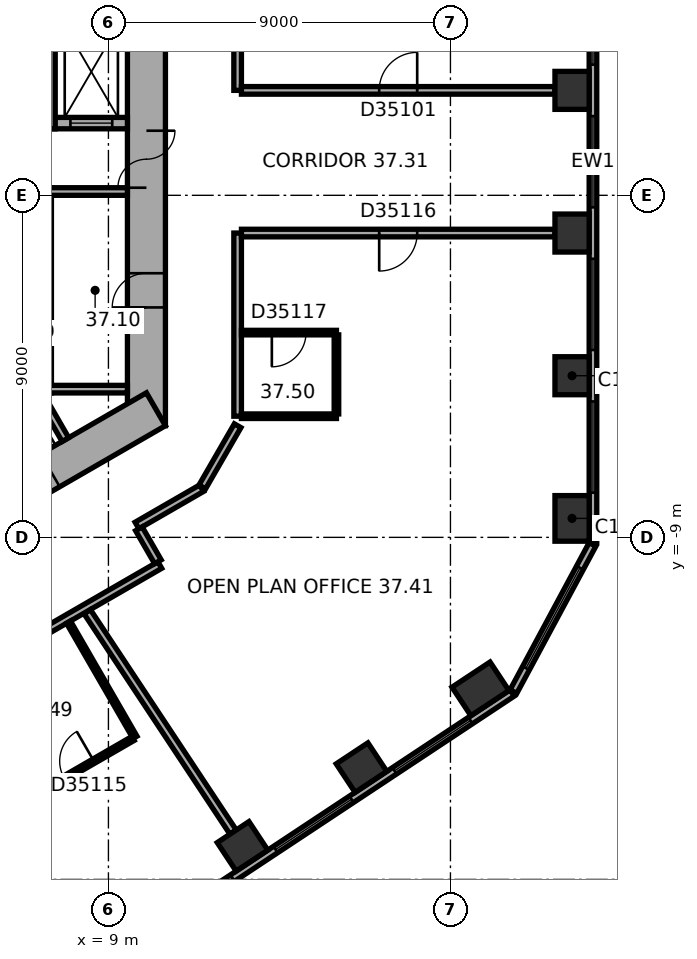
"""IFC4 building model, lengths in metres.
Left out: names, types, materials, properties, quantities, classifications, styles, units other than length and angle.
Written with IfcOpenShell. Run it as: python <this file> out.ifc"""

import sys

from ifc_helpers import new_model, si_unit, direction, frame, frame_2d, origin, origin_2d, place, context, subcontext, project, spatial, rectangle, extrude, element, fill, save


model = new_model("IFC4")
c1 = context("Model", 3, precision=1e-05, world=origin(), true_north=direction((0.0, 1.0)))
c2 = subcontext(c1, "Body", "Model", "MODEL_VIEW")
j1 = project(units=[si_unit("LENGTHUNIT", "METRE"), si_unit("PLANEANGLEUNIT", "RADIAN")], contexts=[c1])
p1 = place(None, origin())
s1 = spatial("IfcSite", under=j1, at=p1, CompositionType="ELEMENT")
p2 = place(p1, origin())
s2 = spatial("IfcBuilding", under=s1, at=p2, CompositionType="ELEMENT")
p3 = place(p2, frame((0.0, 0.0, 154.0)))
s3 = spatial("IfcBuildingStorey", under=s2, at=p3, CompositionType="ELEMENT", Elevation=154.0)
p4 = place(p3, frame((21.2, -8.501, 0.0), z_axis=(0.0, 0.0, 1.0), x_axis=(0.0, 1.0, 0.0)))
e1 = element("IfcColumn", 1, at=p4, inside=s3, PredefinedType="COLUMN", context=c2, shape_type="SweptSolid", body=[
    extrude(rectangle(XDim=1.2, YDim=0.9, at=origin_2d()), origin(), (0.0, 0.0, 1.0), 3.7),
])
for number, where, z_axis, x_axis in (
    (2, (21.2, -4.747, 0.0), (0.0, 0.0, 1.0), (0.0, 1.0, 0.0)),
    (3, (21.2, -0.993, 0.0), (0.0, 0.0, 1.0), (0.0, 1.0, 0.0)),
    (4, (21.2, 2.761, 0.0), (0.0, 0.0, 1.0), (0.0, 1.0, 0.0)),
    (5, (12.529, -17.13, 0.0), (0.0, 0.0, 1.0), (0.834, 0.552, 0.0)),
    (6, (15.659, -15.058, 0.0), (0.0, 0.0, 1.0), (0.834, 0.552, 0.0)),
):
    element("IfcColumn", number, at=place(p3, frame(where, z_axis=z_axis, x_axis=x_axis)), inside=s3, PredefinedType="COLUMN", context=c2, shape_type="SweptSolid", body=[
        extrude(rectangle(XDim=1.0, YDim=0.9, at=origin_2d()), origin(), (0.0, 0.0, 1.0), 3.7),
    ])
p5 = place(p3, frame((18.79, -12.986, 0.0), z_axis=(0.0, 0.0, 1.0), x_axis=(0.833885822067, 0.551936985312, 0.0)))
e7 = element("IfcColumn", 7, at=p5, inside=s3, PredefinedType="COLUMN", context=c2, shape_type="SweptSolid", body=[
    extrude(rectangle(XDim=1.2, YDim=0.9, at=origin_2d()), origin(), (0.0, 0.0, 1.0), 3.7),
])
p6 = place(p3, frame((10.0, -6.062, 0.0), z_axis=(0.0, 0.0, 1.0), x_axis=(0.0, 1.0, 0.0)))
e8 = element("IfcWall", 8, at=p6, inside=s3, PredefinedType="SHEAR", context=c2, shape_type="SweptSolid", body=[
    extrude(rectangle(XDim=12.125, YDim=1.0, at=frame_2d((6.062, 0.0))), origin(), (0.0, 0.0, 1.0), 3.7),
])
p7 = place(p6, frame((6.262, 0.0, 0.0)))
e9 = element("IfcOpeningElement", 9, at=p7, cuts=e8, PredefinedType="OPENING", context=c2, shape_type="SweptSolid", body=[
    extrude(rectangle(XDim=1.5, YDim=2.1, at=frame_2d((0.75, 1.05))), frame((0.0, 0.51, 0.0), z_axis=(0.0, -1.0, 0.0), x_axis=(1.0, 0.0, 0.0)), (0.0, 0.0, 1.0), 1.02),
])
p8 = place(p6, frame((3.112, 0.0, 0.0)))
e10 = element("IfcOpeningElement", 10, at=p8, cuts=e8, PredefinedType="OPENING", context=c2, shape_type="SweptSolid", body=[
    extrude(rectangle(XDim=0.9, YDim=2.1, at=frame_2d((0.45, 1.05))), frame((0.0, 0.51, 0.0), z_axis=(0.0, -1.0, 0.0), x_axis=(1.0, 0.0, 0.0)), (0.0, 0.0, 1.0), 1.02),
])
p9 = place(p3, frame((-0.25, -11.691, 0.0), z_axis=(0.0, 0.0, 1.0), x_axis=(0.866022616891, 0.50000482701, 0.0)))
e11 = element("IfcWall", 11, at=p9, inside=s3, PredefinedType="SHEAR", context=c2, shape_type="SweptSolid", body=[
    extrude(rectangle(XDim=12.125, YDim=1.0, at=frame_2d((6.062, 0.0))), origin(), (0.0, 0.0, 1.0), 3.7),
])
p10 = place(p9, frame((2.612, 0.0, 0.0)))
e12 = element("IfcOpeningElement", 12, at=p10, cuts=e11, PredefinedType="OPENING", context=c2, shape_type="SweptSolid", body=[
    extrude(rectangle(XDim=1.1, YDim=2.1, at=frame_2d((0.55, 1.05))), frame((0.0, 0.51, 0.0), z_axis=(0.0, -1.0, 0.0), x_axis=(1.0, 0.0, 0.0)), (0.0, 0.0, 1.0), 1.02),
])
p11 = place(p9, frame((5.212, 0.0, 0.0)))
e13 = element("IfcOpeningElement", 13, at=p11, cuts=e11, PredefinedType="OPENING", context=c2, shape_type="SweptSolid", body=[
    extrude(rectangle(XDim=1.1, YDim=2.1, at=frame_2d((0.55, 1.05))), frame((0.0, 0.51, 0.0), z_axis=(0.0, -1.0, 0.0), x_axis=(1.0, 0.0, 0.0)), (0.0, 0.0, 1.0), 1.02),
])
p12 = place(p9, frame((7.812, 0.0, 0.0)))
e14 = element("IfcOpeningElement", 14, at=p12, cuts=e11, PredefinedType="OPENING", context=c2, shape_type="SweptSolid", body=[
    extrude(rectangle(XDim=1.1, YDim=2.1, at=frame_2d((0.55, 1.05))), frame((0.0, 0.51, 0.0), z_axis=(0.0, -1.0, 0.0), x_axis=(1.0, 0.0, 0.0)), (0.0, 0.0, 1.0), 1.02),
])
p13 = place(p3, frame((21.75, -9.138, 0.0), z_axis=(0.0, 0.0, 1.0), x_axis=(0.0, 1.0, 0.0)))
e15 = element("IfcWall", 15, at=p13, inside=s3, PredefinedType="STANDARD", context=c2, shape_type="SweptSolid", body=[
    extrude(rectangle(XDim=20.044, YDim=0.2, at=frame_2d((10.022, 0.0))), origin(), (0.0, 0.0, 1.0), 3.7),
])
p14 = place(p13, frame((1.314, 0.0, 0.9)))
e16 = element("IfcOpeningElement", 16, at=p14, cuts=e15, PredefinedType="OPENING", context=c2, shape_type="SweptSolid", body=[
    extrude(rectangle(XDim=2.4, YDim=2.0, at=frame_2d((1.2, 1.0))), frame((0.0, 0.11, 0.0), z_axis=(0.0, -1.0, 0.0), x_axis=(1.0, 0.0, 0.0)), (0.0, 0.0, 1.0), 0.22),
])
p15 = place(p13, frame((5.069, 0.0, 0.9)))
e17 = element("IfcOpeningElement", 17, at=p15, cuts=e15, PredefinedType="OPENING", context=c2, shape_type="SweptSolid", body=[
    extrude(rectangle(XDim=2.4, YDim=2.0, at=frame_2d((1.2, 1.0))), frame((0.0, 0.11, 0.0), z_axis=(0.0, -1.0, 0.0), x_axis=(1.0, 0.0, 0.0)), (0.0, 0.0, 1.0), 0.22),
])
p16 = place(p13, frame((8.823, 0.0, 0.9)))
e18 = element("IfcOpeningElement", 18, at=p16, cuts=e15, PredefinedType="OPENING", context=c2, shape_type="SweptSolid", body=[
    extrude(rectangle(XDim=2.4, YDim=2.0, at=frame_2d((1.2, 1.0))), frame((0.0, 0.11, 0.0), z_axis=(0.0, -1.0, 0.0), x_axis=(1.0, 0.0, 0.0)), (0.0, 0.0, 1.0), 0.22),
])
p17 = place(p13, frame((12.577, 0.0, 0.9)))
e19 = element("IfcOpeningElement", 19, at=p17, cuts=e15, PredefinedType="OPENING", context=c2, shape_type="SweptSolid", body=[
    extrude(rectangle(XDim=2.4, YDim=2.0, at=frame_2d((1.2, 1.0))), frame((0.0, 0.11, 0.0), z_axis=(0.0, -1.0, 0.0), x_axis=(1.0, 0.0, 0.0)), (0.0, 0.0, 1.0), 0.22),
])
p18 = place(p13, frame((16.331, 0.0, 0.9)))
e20 = element("IfcOpeningElement", 20, at=p18, cuts=e15, PredefinedType="OPENING", context=c2, shape_type="SweptSolid", body=[
    extrude(rectangle(XDim=2.4, YDim=2.0, at=frame_2d((1.2, 1.0))), frame((0.0, 0.11, 0.0), z_axis=(0.0, -1.0, 0.0), x_axis=(1.0, 0.0, 0.0)), (0.0, 0.0, 1.0), 0.22),
])
p19 = place(p3, frame((2.911, -24.156, 0.0), z_axis=(0.0, 0.0, 1.0), x_axis=(0.833882163564, 0.551942512668, 0.0)))
e21 = element("IfcWall", 21, at=p19, inside=s3, PredefinedType="STANDARD", context=c2, shape_type="SweptSolid", body=[
    extrude(rectangle(XDim=20.044, YDim=0.2, at=frame_2d((10.022, 0.0))), origin(), (0.0, 0.0, 1.0), 3.7),
])
p20 = place(p19, frame((1.313, 0.0, 0.9)))
e22 = element("IfcOpeningElement", 22, at=p20, cuts=e21, PredefinedType="OPENING", context=c2, shape_type="SweptSolid", body=[
    extrude(rectangle(XDim=2.4, YDim=2.0, at=frame_2d((1.2, 1.0))), frame((0.0, 0.11, 0.0), z_axis=(0.0, -1.0, 0.0), x_axis=(1.0, 0.0, 0.0)), (0.0, 0.0, 1.0), 0.22),
])
p21 = place(p19, frame((5.067, 0.0, 0.9)))
e23 = element("IfcOpeningElement", 23, at=p21, cuts=e21, PredefinedType="OPENING", context=c2, shape_type="SweptSolid", body=[
    extrude(rectangle(XDim=2.4, YDim=2.0, at=frame_2d((1.2, 1.0))), frame((0.0, 0.11, 0.0), z_axis=(0.0, -1.0, 0.0), x_axis=(1.0, 0.0, 0.0)), (0.0, 0.0, 1.0), 0.22),
])
p22 = place(p19, frame((8.821, 0.0, 0.9)))
e24 = element("IfcOpeningElement", 24, at=p22, cuts=e21, PredefinedType="OPENING", context=c2, shape_type="SweptSolid", body=[
    extrude(rectangle(XDim=2.4, YDim=2.0, at=frame_2d((1.2, 1.0))), frame((0.0, 0.11, 0.0), z_axis=(0.0, -1.0, 0.0), x_axis=(1.0, 0.0, 0.0)), (0.0, 0.0, 1.0), 0.22),
])
p23 = place(p19, frame((12.575, 0.0, 0.9)))
e25 = element("IfcOpeningElement", 25, at=p23, cuts=e21, PredefinedType="OPENING", context=c2, shape_type="SweptSolid", body=[
    extrude(rectangle(XDim=2.4, YDim=2.0, at=frame_2d((1.2, 1.0))), frame((0.0, 0.11, 0.0), z_axis=(0.0, -1.0, 0.0), x_axis=(1.0, 0.0, 0.0)), (0.0, 0.0, 1.0), 0.22),
])
p24 = place(p19, frame((16.329, 0.0, 0.9)))
e26 = element("IfcOpeningElement", 26, at=p24, cuts=e21, PredefinedType="OPENING", context=c2, shape_type="SweptSolid", body=[
    extrude(rectangle(XDim=2.4, YDim=2.0, at=frame_2d((1.2, 1.0))), frame((0.0, 0.11, 0.0), z_axis=(0.0, -1.0, 0.0), x_axis=(1.0, 0.0, 0.0)), (0.0, 0.0, 1.0), 0.22),
])
p25 = place(p3, frame((19.658, -13.057, 0.0), z_axis=(0.0, 0.0, 1.0), x_axis=(0.473307879841, 0.880897071672, 0.0)))
e27 = element("IfcWall", 27, at=p25, inside=s3, PredefinedType="STANDARD", context=c2, shape_type="SweptSolid", body=[
    extrude(rectangle(XDim=4.395, YDim=0.2, at=frame_2d((2.197, 0.0))), origin(), (0.0, 0.0, 1.0), 3.7),
])
p26 = place(p25, frame((0.698, 0.0, 0.9)))
e28 = element("IfcOpeningElement", 28, at=p26, cuts=e27, PredefinedType="OPENING", context=c2, shape_type="SweptSolid", body=[
    extrude(rectangle(XDim=3.0, YDim=2.0, at=frame_2d((1.5, 1.0))), frame((0.0, 0.11, 0.0), z_axis=(0.0, -1.0, 0.0), x_axis=(1.0, 0.0, 0.0)), (0.0, 0.0, 1.0), 0.22),
])
for number, where, z_axis, x_axis in (
    (29, (7.3, -5.1, 0.0), (0.0, 0.0, 1.0), (1.0, 0.0, 0.0)),
    (30, (7.3, 0.1, 0.0), (0.0, 0.0, 1.0), (1.0, 0.0, 0.0)),
    (31, (6.768, -4.522, 0.0), (0.0, 0.0, 1.0), (0.5, -0.866, 0.0)),
):
    element("IfcWall", number, at=place(p3, frame(where, z_axis=z_axis, x_axis=x_axis)), inside=s3, PredefinedType="PARTITIONING", context=c2, shape_type="SweptSolid", body=[
        extrude(rectangle(XDim=2.2, YDim=0.2, at=frame_2d((1.1, 0.0))), origin(), (0.0, 0.0, 1.0), 3.42),
    ])
p27 = place(p3, frame((7.3, 1.9, 0.0), z_axis=(0.0, 0.0, 1.0), x_axis=(1.0, 0.0, 0.0)))
e32 = element("IfcWall", 32, at=p27, inside=s3, PredefinedType="SHEAR", context=c2, shape_type="SweptSolid", body=[
    extrude(rectangle(XDim=2.2, YDim=0.3, at=frame_2d((1.1, 0.0))), origin(), (0.0, 0.0, 1.0), 3.42),
])
p28 = place(p27, frame((0.7, 0.0, 0.0)))
e33 = element("IfcOpeningElement", 33, at=p28, cuts=e32, PredefinedType="OPENING", context=c2, shape_type="SweptSolid", body=[
    extrude(rectangle(XDim=1.1, YDim=2.1, at=frame_2d((0.55, 1.05))), frame((0.0, 0.16, 0.0), z_axis=(0.0, -1.0, 0.0), x_axis=(1.0, 0.0, 0.0)), (0.0, 0.0, 1.0), 0.32),
])
p29 = place(p3, frame((7.45, 1.75, 0.0), z_axis=(0.0, 0.0, 1.0), x_axis=(0.0, 1.0, 0.0)))
e34 = element("IfcWall", 34, at=p29, inside=s3, PredefinedType="SHEAR", context=c2, shape_type="SweptSolid", body=[
    extrude(rectangle(XDim=3.35, YDim=0.3, at=frame_2d((1.675, 0.0))), origin(), (0.0, 0.0, 1.0), 3.42),
])
p30 = place(p3, frame((4.955, -12.844, 0.0), z_axis=(0.0, 0.0, 1.0), x_axis=(0.86602379309, 0.500002789795, 0.0)))
e35 = element("IfcWall", 35, at=p30, inside=s3, PredefinedType="PARTITIONING", context=c2, shape_type="SweptSolid", body=[
    extrude(rectangle(XDim=6.232, YDim=0.2, at=frame_2d((3.116, 0.0))), origin(), (0.0, 0.0, 1.0), 3.42),
])
p31 = place(p3, frame((7.949, -11.231, 0.0), z_axis=(0.0, 0.0, 1.0), x_axis=(0.500010275428, -0.866019471182, 0.0)))
e36 = element("IfcWall", 36, at=p31, inside=s3, PredefinedType="PARTITIONING", context=c2, shape_type="SweptSolid", body=[
    extrude(rectangle(XDim=3.5, YDim=0.12, at=frame_2d((1.75, 0.0))), origin(), (0.0, 0.0, 1.0), 3.42),
])
p32 = place(p3, frame((9.647, -14.292, 0.0), z_axis=(0.0, 0.0, 1.0), x_axis=(-0.866040564224, -0.499973740429, 0.0)))
e37 = element("IfcWall", 37, at=p32, inside=s3, PredefinedType="PARTITIONING", context=c2, shape_type="SweptSolid", body=[
    extrude(rectangle(XDim=3.28, YDim=0.12, at=frame_2d((1.64, 0.0))), origin(), (0.0, 0.0, 1.0), 3.42),
])
p33 = place(p32, frame((1.19, 0.0, 0.0)))
e38 = element("IfcOpeningElement", 38, at=p33, cuts=e37, PredefinedType="OPENING", context=c2, shape_type="SweptSolid", body=[
    extrude(rectangle(XDim=0.9, YDim=2.1, at=frame_2d((0.45, 1.05))), frame((0.0, 0.07, 0.0), z_axis=(0.0, -1.0, 0.0), x_axis=(1.0, 0.0, 0.0)), (0.0, 0.0, 1.0), 0.14),
])
p34 = place(p3, frame((9.752, -8.688, 0.0), z_axis=(0.0, 0.0, 1.0), x_axis=(0.865974105138, 0.500088841337, 0.0)))
e39 = element("IfcWall", 39, at=p34, inside=s3, PredefinedType="PARTITIONING", context=c2, shape_type="SweptSolid", body=[
    extrude(rectangle(XDim=1.961, YDim=0.2, at=frame_2d((0.98, 0.0))), origin(), (0.0, 0.0, 1.0), 3.42),
])
p35 = place(p3, frame((10.302, -9.642, 0.0), z_axis=(0.0, 0.0, 1.0), x_axis=(-0.500074377092, 0.865982457891, 0.0)))
e40 = element("IfcWall", 40, at=p35, inside=s3, PredefinedType="PARTITIONING", context=c2, shape_type="SweptSolid", body=[
    extrude(rectangle(XDim=1.001, YDim=0.2, at=frame_2d((0.5, 0.0))), origin(), (0.0, 0.0, 1.0), 3.42),
])
p36 = place(p3, frame((11.47, -7.673, 0.0), z_axis=(0.0, 0.0, 1.0), x_axis=(0.499964847546, 0.866045698112, 0.0)))
e41 = element("IfcWall", 41, at=p36, inside=s3, PredefinedType="PARTITIONING", context=c2, shape_type="SweptSolid", body=[
    extrude(rectangle(XDim=1.86, YDim=0.2, at=frame_2d((0.93, 0.0))), origin(), (0.0, 0.0, 1.0), 3.42),
])
p37 = place(p3, frame((12.281, -16.755, 0.0), z_axis=(0.0, 0.0, 1.0), x_axis=(-0.551925794663, 0.833893228888, 0.0)))
e42 = element("IfcWall", 42, at=p37, inside=s3, PredefinedType="PARTITIONING", context=c2, shape_type="SweptSolid", body=[
    extrude(rectangle(XDim=6.953, YDim=0.2, at=frame_2d((3.476, 0.0))), origin(), (0.0, 0.0, 1.0), 3.42),
])
p38 = place(p3, frame((12.4, -5.812, 0.0), z_axis=(0.0, 0.0, 1.0), x_axis=(0.0, 1.0, 0.0)))
e43 = element("IfcWall", 43, at=p38, inside=s3, PredefinedType="PARTITIONING", context=c2, shape_type="SweptSolid", body=[
    extrude(rectangle(XDim=4.819, YDim=0.2, at=frame_2d((2.41, 0.0))), origin(), (0.0, 0.0, 1.0), 3.42),
])
p39 = place(p3, frame((12.4, 2.761, 0.0), z_axis=(0.0, 0.0, 1.0), x_axis=(0.0, 1.0, 0.0)))
e44 = element("IfcWall", 44, at=p39, inside=s3, PredefinedType="PARTITIONING", context=c2, shape_type="SweptSolid", body=[
    extrude(rectangle(XDim=3.301, YDim=0.2, at=frame_2d((1.65, 0.0))), origin(), (0.0, 0.0, 1.0), 3.42),
])
p40 = place(p3, frame((12.5, -3.612, 0.0), z_axis=(0.0, 0.0, 1.0), x_axis=(1.0, 0.0, 0.0)))
e45 = element("IfcWall", 45, at=p40, inside=s3, PredefinedType="PARTITIONING", context=c2, shape_type="SweptSolid", body=[
    extrude(rectangle(XDim=2.5, YDim=0.12, at=frame_2d((1.25, 0.0))), origin(), (0.0, 0.0, 1.0), 3.42),
])
p41 = place(p40, frame((0.8, 0.0, 0.0)))
e46 = element("IfcOpeningElement", 46, at=p41, cuts=e45, PredefinedType="OPENING", context=c2, shape_type="SweptSolid", body=[
    extrude(rectangle(XDim=0.9, YDim=2.1, at=frame_2d((0.45, 1.05))), frame((0.0, 0.07, 0.0), z_axis=(0.0, -1.0, 0.0), x_axis=(1.0, 0.0, 0.0)), (0.0, 0.0, 1.0), 0.14),
])
p42 = place(p3, frame((12.5, -0.993, 0.0), z_axis=(0.0, 0.0, 1.0), x_axis=(1.0, 0.0, 0.0)))
e47 = element("IfcWall", 47, at=p42, inside=s3, PredefinedType="PARTITIONING", context=c2, shape_type="SweptSolid", body=[
    extrude(rectangle(XDim=8.25, YDim=0.2, at=frame_2d((4.125, 0.0))), origin(), (0.0, 0.0, 1.0), 2.87),
])
p43 = place(p42, frame((3.625, 0.0, 0.0)))
e48 = element("IfcOpeningElement", 48, at=p43, cuts=e47, PredefinedType="OPENING", context=c2, shape_type="SweptSolid", body=[
    extrude(rectangle(XDim=1.0, YDim=2.1, at=frame_2d((0.5, 1.05))), frame((0.0, 0.11, 0.0), z_axis=(0.0, -1.0, 0.0), x_axis=(1.0, 0.0, 0.0)), (0.0, 0.0, 1.0), 0.22),
])
p44 = place(p3, frame((15.0, -5.812, 0.0), z_axis=(0.0, 0.0, 1.0), x_axis=(-1.0, 0.0, 0.0)))
e49 = element("IfcWall", 49, at=p44, inside=s3, PredefinedType="PARTITIONING", context=c2, shape_type="SweptSolid", body=[
    extrude(rectangle(XDim=2.5, YDim=0.12, at=frame_2d((1.25, 0.0))), origin(), (0.0, 0.0, 1.0), 3.42),
])
p45 = place(p3, frame((15.0, -3.672, 0.0), z_axis=(0.0, 0.0, 1.0), x_axis=(0.0, -1.0, 0.0)))
e50 = element("IfcWall", 50, at=p45, inside=s3, PredefinedType="PARTITIONING", context=c2, shape_type="SweptSolid", body=[
    extrude(rectangle(XDim=2.08, YDim=0.12, at=frame_2d((1.04, 0.0))), origin(), (0.0, 0.0, 1.0), 3.42),
])
p46 = place(p3, frame((20.75, 2.761, 0.0), z_axis=(0.0, 0.0, 1.0), x_axis=(-1.0, 0.0, 0.0)))
e51 = element("IfcWall", 51, at=p46, inside=s3, PredefinedType="PARTITIONING", context=c2, shape_type="SweptSolid", body=[
    extrude(rectangle(XDim=8.25, YDim=0.2, at=frame_2d((4.125, 0.0))), origin(), (0.0, 0.0, 1.0), 3.42),
])
p47 = place(p46, frame((3.625, 0.0, 0.0)))
e52 = element("IfcOpeningElement", 52, at=p47, cuts=e51, PredefinedType="OPENING", context=c2, shape_type="SweptSolid", body=[
    extrude(rectangle(XDim=1.0, YDim=2.1, at=frame_2d((0.5, 1.05))), frame((0.0, 0.11, 0.0), z_axis=(0.0, -1.0, 0.0), x_axis=(1.0, 0.0, 0.0)), (0.0, 0.0, 1.0), 0.22),
])
p48 = place(p14, origin())
e53 = element("IfcWindow", 53, at=p48, inside=s3, PartitioningType="SINGLE_PANEL", PredefinedType="WINDOW", context=c2, shape_type="SweptSolid", body=[
    extrude(rectangle(XDim=2.4, YDim=2.0, at=frame_2d((1.2, 1.0))), frame((0.0, 0.03, 0.0), z_axis=(0.0, -1.0, 0.0), x_axis=(1.0, 0.0, 0.0)), (0.0, 0.0, 1.0), 0.06),
])
fill(e16, e53)
p49 = place(p15, origin())
e54 = element("IfcWindow", 54, at=p49, inside=s3, PartitioningType="SINGLE_PANEL", PredefinedType="WINDOW", context=c2, shape_type="SweptSolid", body=[
    extrude(rectangle(XDim=2.4, YDim=2.0, at=frame_2d((1.2, 1.0))), frame((0.0, 0.03, 0.0), z_axis=(0.0, -1.0, 0.0), x_axis=(1.0, 0.0, 0.0)), (0.0, 0.0, 1.0), 0.06),
])
fill(e17, e54)
p50 = place(p16, origin())
e55 = element("IfcWindow", 55, at=p50, inside=s3, PartitioningType="SINGLE_PANEL", PredefinedType="WINDOW", context=c2, shape_type="SweptSolid", body=[
    extrude(rectangle(XDim=2.4, YDim=2.0, at=frame_2d((1.2, 1.0))), frame((0.0, 0.03, 0.0), z_axis=(0.0, -1.0, 0.0), x_axis=(1.0, 0.0, 0.0)), (0.0, 0.0, 1.0), 0.06),
])
fill(e18, e55)
p51 = place(p17, origin())
e56 = element("IfcWindow", 56, at=p51, inside=s3, PartitioningType="SINGLE_PANEL", PredefinedType="WINDOW", context=c2, shape_type="SweptSolid", body=[
    extrude(rectangle(XDim=2.4, YDim=2.0, at=frame_2d((1.2, 1.0))), frame((0.0, 0.03, 0.0), z_axis=(0.0, -1.0, 0.0), x_axis=(1.0, 0.0, 0.0)), (0.0, 0.0, 1.0), 0.06),
])
fill(e19, e56)
p52 = place(p22, origin())
e57 = element("IfcWindow", 57, at=p52, inside=s3, PartitioningType="SINGLE_PANEL", PredefinedType="WINDOW", context=c2, shape_type="SweptSolid", body=[
    extrude(rectangle(XDim=2.4, YDim=2.0, at=frame_2d((1.2, 1.0))), frame((0.0, 0.03, 0.0), z_axis=(0.0, -1.0, 0.0), x_axis=(1.0, 0.0, 0.0)), (0.0, 0.0, 1.0), 0.06),
])
fill(e24, e57)
p53 = place(p23, origin())
e58 = element("IfcWindow", 58, at=p53, inside=s3, PartitioningType="SINGLE_PANEL", PredefinedType="WINDOW", context=c2, shape_type="SweptSolid", body=[
    extrude(rectangle(XDim=2.4, YDim=2.0, at=frame_2d((1.2, 1.0))), frame((0.0, 0.03, 0.0), z_axis=(0.0, -1.0, 0.0), x_axis=(1.0, 0.0, 0.0)), (0.0, 0.0, 1.0), 0.06),
])
fill(e25, e58)
p54 = place(p24, origin())
e59 = element("IfcWindow", 59, at=p54, inside=s3, PartitioningType="SINGLE_PANEL", PredefinedType="WINDOW", context=c2, shape_type="SweptSolid", body=[
    extrude(rectangle(XDim=2.4, YDim=2.0, at=frame_2d((1.2, 1.0))), frame((0.0, 0.03, 0.0), z_axis=(0.0, -1.0, 0.0), x_axis=(1.0, 0.0, 0.0)), (0.0, 0.0, 1.0), 0.06),
])
fill(e26, e59)
p55 = place(p26, origin())
e60 = element("IfcWindow", 60, at=p55, inside=s3, PartitioningType="SINGLE_PANEL", PredefinedType="WINDOW", context=c2, shape_type="SweptSolid", body=[
    extrude(rectangle(XDim=3.0, YDim=2.0, at=frame_2d((1.5, 1.0))), frame((0.0, 0.03, 0.0), z_axis=(0.0, -1.0, 0.0), x_axis=(1.0, 0.0, 0.0)), (0.0, 0.0, 1.0), 0.06),
])
fill(e28, e60)
p56 = place(p7, origin())
e61 = element("IfcDoor", 61, at=p56, inside=s3, OperationType="DOUBLE_DOOR_SINGLE_SWING", PredefinedType="DOOR", context=c2, shape_type="SweptSolid", body=[
    extrude(rectangle(XDim=1.5, YDim=2.1, at=frame_2d((0.75, 1.05))), frame((0.0, 0.025, 0.0), z_axis=(0.0, -1.0, 0.0), x_axis=(1.0, 0.0, 0.0)), (0.0, 0.0, 1.0), 0.05),
])
fill(e9, e61)
p57 = place(p8, origin())
e62 = element("IfcDoor", 62, at=p57, inside=s3, OperationType="SINGLE_SWING_LEFT", PredefinedType="DOOR", context=c2, shape_type="SweptSolid", body=[
    extrude(rectangle(XDim=0.9, YDim=2.1, at=frame_2d((0.45, 1.05))), frame((0.0, 0.025, 0.0), z_axis=(0.0, -1.0, 0.0), x_axis=(1.0, 0.0, 0.0)), (0.0, 0.0, 1.0), 0.05),
])
fill(e10, e62)
p58 = place(p28, origin())
e63 = element("IfcDoor", 63, at=p58, inside=s3, OperationType="DOUBLE_DOOR_SLIDING", PredefinedType="DOOR", context=c2, shape_type="SweptSolid", body=[
    extrude(rectangle(XDim=1.1, YDim=2.1, at=frame_2d((0.55, 1.05))), frame((0.0, 0.025, 0.0), z_axis=(0.0, -1.0, 0.0), x_axis=(1.0, 0.0, 0.0)), (0.0, 0.0, 1.0), 0.05),
])
fill(e33, e63)
p59 = place(p47, origin())
e64 = element("IfcDoor", 64, at=p59, inside=s3, OperationType="SINGLE_SWING_LEFT", PredefinedType="DOOR", context=c2, shape_type="SweptSolid", body=[
    extrude(rectangle(XDim=1.0, YDim=2.1, at=frame_2d((0.5, 1.05))), frame((0.0, 0.025, 0.0), z_axis=(0.0, -1.0, 0.0), x_axis=(1.0, 0.0, 0.0)), (0.0, 0.0, 1.0), 0.05),
])
fill(e52, e64)
p60 = place(p33, origin())
e65 = element("IfcDoor", 65, at=p60, inside=s3, OperationType="SINGLE_SWING_LEFT", PredefinedType="DOOR", context=c2, shape_type="SweptSolid", body=[
    extrude(rectangle(XDim=0.9, YDim=2.1, at=frame_2d((0.45, 1.05))), frame((0.0, 0.025, 0.0), z_axis=(0.0, -1.0, 0.0), x_axis=(1.0, 0.0, 0.0)), (0.0, 0.0, 1.0), 0.05),
])
fill(e38, e65)
p61 = place(p43, origin())
e66 = element("IfcDoor", 66, at=p61, inside=s3, OperationType="SINGLE_SWING_LEFT", PredefinedType="DOOR", context=c2, shape_type="SweptSolid", body=[
    extrude(rectangle(XDim=1.0, YDim=2.1, at=frame_2d((0.5, 1.05))), frame((0.0, 0.025, 0.0), z_axis=(0.0, -1.0, 0.0), x_axis=(1.0, 0.0, 0.0)), (0.0, 0.0, 1.0), 0.05),
])
fill(e48, e66)
p62 = place(p41, origin())
e67 = element("IfcDoor", 67, at=p62, inside=s3, OperationType="SINGLE_SWING_LEFT", PredefinedType="DOOR", context=c2, shape_type="SweptSolid", body=[
    extrude(rectangle(XDim=0.9, YDim=2.1, at=frame_2d((0.45, 1.05))), frame((0.0, 0.025, 0.0), z_axis=(0.0, -1.0, 0.0), x_axis=(1.0, 0.0, 0.0)), (0.0, 0.0, 1.0), 0.05),
])
fill(e46, e67)
save(model, sys.argv[1])
